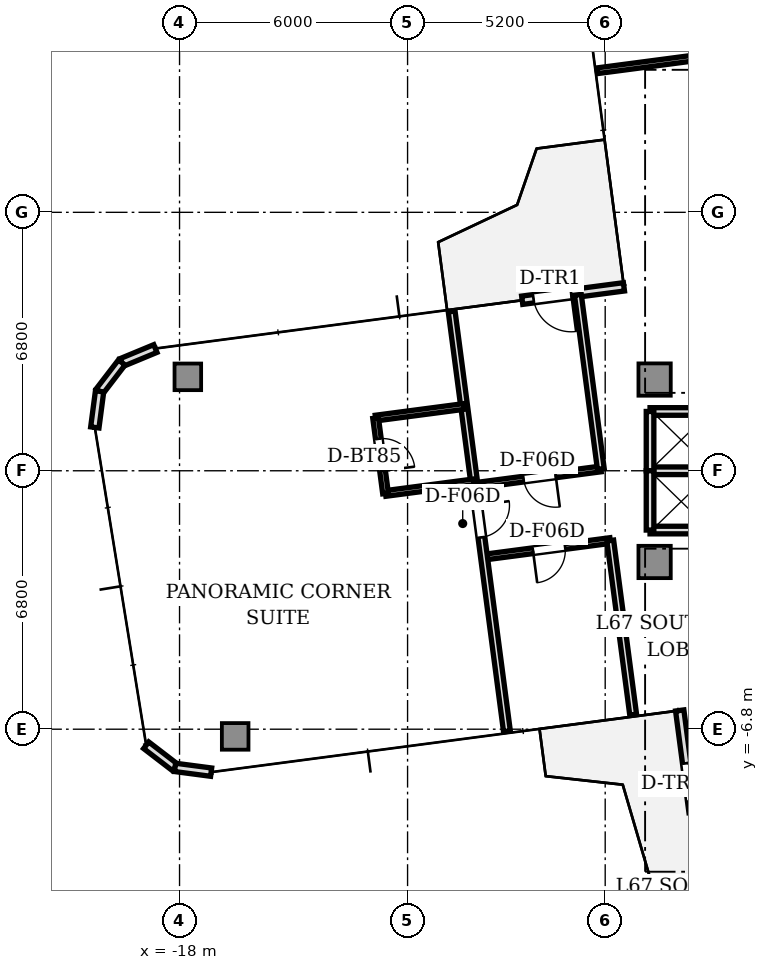
"""IFC4 building model, lengths in metres.
Left out: names, types, materials, properties, quantities, classifications, styles, units other than length and angle.
Written with IfcOpenShell. Run it as: python <this file> out.ifc"""

import sys

from ifc_helpers import new_model, si_unit, direction, frame, frame_2d, origin, origin_2d, place, context, subcontext, project, spatial, rectangle, extrude, source, transform, mapped, element, fill, save


model = new_model("IFC4")
c1 = context("Model", 3, precision=1e-05, world=origin(), true_north=direction((0.0, 1.0)))
c2 = subcontext(c1, "Body", "Model", "MODEL_VIEW")
j1 = project(units=[si_unit("LENGTHUNIT", "METRE"), si_unit("PLANEANGLEUNIT", "RADIAN")], contexts=[c1])
p1 = place(None, origin())
s1 = spatial("IfcSite", under=j1, at=p1, CompositionType="ELEMENT")
p2 = place(p1, origin())
s2 = spatial("IfcBuilding", under=s1, at=p2, CompositionType="ELEMENT")
p3 = place(p2, frame((0.0, 0.0, 241.15)))
s3 = spatial("IfcBuildingStorey", under=s2, at=p3, CompositionType="ELEMENT", Elevation=241.15)
m1 = source(origin(), c2, "Body", "SweptSolid", [
    extrude(rectangle(XDim=0.85, YDim=0.85, at=origin_2d()), origin(), (0.0, 0.0, 1.0), 3.11),
])
for number, where, z_axis, x_axis in (
    (1, (-5.5, 2.4, 0.0), (0.0, 0.0, 1.0), (1.0, 0.0, 0.0)),
    (2, (-5.5, -2.4, 0.0), (0.0, 0.0, 1.0), (1.0, 0.0, 0.0)),
):
    element("IfcColumn", number, at=place(p3, frame(where, z_axis=z_axis, x_axis=x_axis)), inside=s3, PredefinedType="COLUMN", context=c2, shape_type="MappedRepresentation", body=[
        mapped(m1, transform((0.0, 0.0, 0.0), scale=1.0)),
    ])
m2 = source(origin(), c2, "Body", "SweptSolid", [
    extrude(rectangle(XDim=0.7, YDim=0.7, at=origin_2d()), origin(), (0.0, 0.0, 1.0), 3.11),
])
for number, where, z_axis, x_axis in (
    (3, (-17.782, 2.471, 0.0), (0.0, 0.0, 1.0), (1.0, 0.0, 0.0)),
    (4, (-16.536, -6.989, 0.0), (0.0, 0.0, 1.0), (1.0, 0.0, 0.0)),
):
    element("IfcColumn", number, at=place(p3, frame(where, z_axis=z_axis, x_axis=x_axis)), inside=s3, PredefinedType="COLUMN", context=c2, shape_type="MappedRepresentation", body=[
        mapped(m2, transform((0.0, 0.0, 0.0), scale=1.0)),
    ])
p4 = place(p3, frame((-6.307, 4.839, 0.0), z_axis=(0.0, 0.0, 1.0), x_axis=(-0.991449985986, -0.130487261016, 0.0)))
e5 = element("IfcWall", 5, at=p4, inside=s3, PredefinedType="STANDARD", context=c2, shape_type="SweptSolid", body=[
    extrude(rectangle(XDim=2.7, YDim=0.22, at=frame_2d((1.35, 0.0))), origin(), (0.0, 0.0, 1.0), 3.11),
])
p5 = place(p4, frame((1.4, 0.0, 0.0)))
e6 = element("IfcOpeningElement", 6, at=p5, cuts=e5, PredefinedType="OPENING", context=c2, shape_type="SweptSolid", body=[
    extrude(rectangle(XDim=1.0, YDim=2.2, at=frame_2d((0.5, 1.1))), frame((0.0, 0.12, 0.0), z_axis=(0.0, -1.0, 0.0), x_axis=(1.0, 0.0, 0.0)), (0.0, 0.0, 1.0), 0.24),
])
for number, where, z_axis, x_axis in (
    (7, (-18.636, 3.216, 0.0), (0.0, 0.0, 1.0), (-0.924, -0.383, 0.0)),
    (8, (-19.521, 2.85, 0.0), (0.0, 0.0, 1.0), (-0.609, -0.793, 0.0)),
    (9, (-20.104, 2.09, 0.0), (0.0, 0.0, 1.0), (-0.131, -0.991, 0.0)),
):
    element("IfcWall", number, at=place(p3, frame(where, z_axis=z_axis, x_axis=x_axis)), inside=s3, PredefinedType="STANDARD", context=c2, shape_type="SweptSolid", body=[
        extrude(rectangle(XDim=0.958, YDim=0.22, at=frame_2d((0.479, 0.0))), origin(), (0.0, 0.0, 1.0), 3.11),
    ])
p6 = place(p3, frame((-18.878, -7.222, 0.0), z_axis=(0.0, 0.0, 1.0), x_axis=(0.793372339443, -0.608736668033, 0.0)))
e10 = element("IfcWall", 10, at=p6, inside=s3, PredefinedType="STANDARD", context=c2, shape_type="SweptSolid", body=[
    extrude(rectangle(XDim=0.957, YDim=0.22, at=frame_2d((0.479, 0.0))), origin(), (0.0, 0.0, 1.0), 3.11),
])
p7 = place(p3, frame((-18.118, -7.805, 0.0), z_axis=(0.0, 0.0, 1.0), x_axis=(0.991449089759, -0.130494070426, 0.0)))
e11 = element("IfcWall", 11, at=p7, inside=s3, PredefinedType="STANDARD", context=c2, shape_type="SweptSolid", body=[
    extrude(rectangle(XDim=0.958, YDim=0.22, at=frame_2d((0.479, 0.0))), origin(), (0.0, 0.0, 1.0), 3.11),
])
p8 = place(p3, frame((-4.839, -6.307, 0.0), z_axis=(0.0, 0.0, 1.0), x_axis=(0.130487261016, -0.991449985986, 0.0)))
e12 = element("IfcWall", 12, at=p8, inside=s3, PredefinedType="STANDARD", context=c2, shape_type="SweptSolid", body=[
    extrude(rectangle(XDim=2.7, YDim=0.22, at=frame_2d((1.35, 0.0))), origin(), (0.0, 0.0, 1.0), 3.11),
])
p9 = place(p8, frame((1.4, 0.0, 0.0)))
e13 = element("IfcOpeningElement", 13, at=p9, cuts=e12, PredefinedType="OPENING", context=c2, shape_type="SweptSolid", body=[
    extrude(rectangle(XDim=1.0, YDim=2.2, at=frame_2d((0.5, 1.1))), frame((0.0, 0.12, 0.0), z_axis=(0.0, -1.0, 0.0), x_axis=(1.0, 0.0, 0.0)), (0.0, 0.0, 1.0), 0.24),
])
for number, where, z_axis, x_axis in (
    (14, (-5.62, 1.56, 0.0), (0.0, 0.0, 1.0), (1.0, 0.0, 0.0)),
    (15, (-5.62, -1.56, 0.0), (0.0, 0.0, 1.0), (1.0, 0.0, 0.0)),
    (16, (-5.62, 0.0, 0.0), (0.0, 0.0, 1.0), (1.0, 0.0, 0.0)),
):
    element("IfcWall", number, at=place(p3, frame(where, z_axis=z_axis, x_axis=x_axis)), inside=s3, PredefinedType="SOLIDWALL", context=c2, shape_type="SweptSolid", body=[
        extrude(rectangle(XDim=1.64, YDim=0.2, at=frame_2d((0.82, 0.0))), origin(), (0.0, 0.0, 1.0), 2.66),
    ])
for number, where, z_axis, x_axis in (
    (17, (-5.62, 0.0, 0.0), (0.0, 0.0, 1.0), (0.0, 1.0, 0.0)),
    (18, (-5.62, -1.56, 0.0), (0.0, 0.0, 1.0), (0.0, 1.0, 0.0)),
):
    element("IfcWall", number, at=place(p3, frame(where, z_axis=z_axis, x_axis=x_axis)), inside=s3, PredefinedType="SOLIDWALL", context=c2, shape_type="SweptSolid", body=[
        extrude(rectangle(XDim=1.56, YDim=0.2, at=frame_2d((0.78, 0.0))), origin(), (0.0, 0.0, 1.0), 2.66),
    ])
p10 = place(p3, frame((4.042, 11.98, 0.0), z_axis=(0.0, 0.0, 1.0), x_axis=(-0.991444895998, -0.130525929223, 0.0)))
e19 = element("IfcWall", 19, at=p10, inside=s3, PredefinedType="PARTITIONING", context=c2, shape_type="SweptSolid", body=[
    extrude(rectangle(XDim=11.142, YDim=0.15, at=frame_2d((5.571, 0.0))), origin(), (0.0, 0.0, 1.0), 2.66),
])
p11 = place(p10, frame((4.771, 0.0, 0.0)))
e20 = element("IfcOpeningElement", 20, at=p11, cuts=e19, PredefinedType="OPENING", context=c2, shape_type="SweptSolid", body=[
    extrude(rectangle(XDim=1.6, YDim=2.25, at=frame_2d((0.8, 1.125))), frame((0.0, 0.085, 0.0), z_axis=(0.0, -1.0, 0.0), x_axis=(1.0, 0.0, 0.0)), (0.0, 0.0, 1.0), 0.17),
])
p12 = place(p3, frame((-6.667, -1.836, 0.0), z_axis=(0.0, 0.0, 1.0), x_axis=(-0.991444866817, -0.130526150873, 0.0)))
e21 = element("IfcWall", 21, at=p12, inside=s3, PredefinedType="PARTITIONING", context=c2, shape_type="SweptSolid", body=[
    extrude(rectangle(XDim=3.35, YDim=0.15, at=frame_2d((1.675, 0.0))), origin(), (0.0, 0.0, 1.0), 2.66),
])
p13 = place(p12, frame((1.2, 0.0, 0.0)))
e22 = element("IfcOpeningElement", 22, at=p13, cuts=e21, PredefinedType="OPENING", context=c2, shape_type="SweptSolid", body=[
    extrude(rectangle(XDim=0.85, YDim=2.1, at=frame_2d((0.425, 1.05))), frame((0.0, 0.085, 0.0), z_axis=(0.0, -1.0, 0.0), x_axis=(1.0, 0.0, 0.0)), (0.0, 0.0, 1.0), 0.17),
])
p14 = place(p3, frame((-6.915, 0.048, 0.0), z_axis=(0.0, 0.0, 1.0), x_axis=(-0.991446108327, -0.130516720324, 0.0)))
e23 = element("IfcWall", 23, at=p14, inside=s3, PredefinedType="PARTITIONING", context=c2, shape_type="SweptSolid", body=[
    extrude(rectangle(XDim=3.35, YDim=0.15, at=frame_2d((1.675, 0.0))), origin(), (0.0, 0.0, 1.0), 2.66),
])
p15 = place(p14, frame((1.2, 0.0, 0.0)))
e24 = element("IfcOpeningElement", 24, at=p15, cuts=e23, PredefinedType="OPENING", context=c2, shape_type="SweptSolid", body=[
    extrude(rectangle(XDim=0.85, YDim=2.1, at=frame_2d((0.425, 1.05))), frame((0.0, 0.085, 0.0), z_axis=(0.0, -1.0, 0.0), x_axis=(1.0, 0.0, 0.0)), (0.0, 0.0, 1.0), 0.17),
])
p16 = place(p3, frame((-6.667, -1.836, 0.0), z_axis=(0.0, 0.0, 1.0), x_axis=(0.130547444225, -0.991442063263, 0.0)))
e25 = element("IfcWall", 25, at=p16, inside=s3, PredefinedType="PARTITIONING", context=c2, shape_type="SweptSolid", body=[
    extrude(rectangle(XDim=4.621, YDim=0.18, at=frame_2d((2.311, 0.0))), origin(), (0.0, 0.0, 1.0), 2.66),
])
p17 = place(p3, frame((-7.519, 4.629, 0.0), z_axis=(0.0, 0.0, 1.0), x_axis=(0.130554282615, -0.991441162798, 0.0)))
e26 = element("IfcWall", 26, at=p17, inside=s3, PredefinedType="PARTITIONING", context=c2, shape_type="SweptSolid", body=[
    extrude(rectangle(XDim=4.621, YDim=0.18, at=frame_2d((2.311, 0.0))), origin(), (0.0, 0.0, 1.0), 2.66),
])
p18 = place(p3, frame((-10.84, 4.192, 0.0), z_axis=(0.0, 0.0, 1.0), x_axis=(0.130528764816, -0.991444522682, 0.0)))
e27 = element("IfcWall", 27, at=p18, inside=s3, PredefinedType="PARTITIONING", context=c2, shape_type="SweptSolid", body=[
    extrude(rectangle(XDim=11.142, YDim=0.18, at=frame_2d((5.571, 0.0))), origin(), (0.0, 0.0, 1.0), 2.66),
])
p19 = place(p18, frame((5.146, 0.0, 0.0)))
e28 = element("IfcOpeningElement", 28, at=p19, cuts=e27, PredefinedType="OPENING", context=c2, shape_type="SweptSolid", body=[
    extrude(rectangle(XDim=0.85, YDim=2.1, at=frame_2d((0.425, 1.05))), frame((0.0, 0.1, 0.0), z_axis=(0.0, -1.0, 0.0), x_axis=(1.0, 0.0, 0.0)), (0.0, 0.0, 1.0), 0.2),
])
p20 = place(p3, frame((-10.25, -0.29, 0.0), z_axis=(0.0, 0.0, 1.0), x_axis=(-0.991436251812, -0.130591571678, 0.0)))
e29 = element("IfcWall", 29, at=p20, inside=s3, PredefinedType="PARTITIONING", context=c2, shape_type="SweptSolid", body=[
    extrude(rectangle(XDim=2.35, YDim=0.15, at=frame_2d((1.175, 0.0))), origin(), (0.0, 0.0, 1.0), 2.66),
])
p21 = place(p3, frame((-10.511, 1.692, 0.0), z_axis=(0.0, 0.0, 1.0), x_axis=(-0.991451466659, -0.130476010281, 0.0)))
e30 = element("IfcWall", 30, at=p21, inside=s3, PredefinedType="PARTITIONING", context=c2, shape_type="SweptSolid", body=[
    extrude(rectangle(XDim=2.35, YDim=0.15, at=frame_2d((1.175, 0.0))), origin(), (0.0, 0.0, 1.0), 2.66),
])
p22 = place(p3, frame((-12.841, 1.386, 0.0), z_axis=(0.0, 0.0, 1.0), x_axis=(0.130612392842, -0.991433509034, 0.0)))
e31 = element("IfcWall", 31, at=p22, inside=s3, PredefinedType="PARTITIONING", context=c2, shape_type="SweptSolid", body=[
    extrude(rectangle(XDim=2.0, YDim=0.15, at=frame_2d((1.0, 0.0))), origin(), (0.0, 0.0, 1.0), 2.66),
])
p23 = place(p22, frame((0.55, 0.0, 0.0)))
e32 = element("IfcOpeningElement", 32, at=p23, cuts=e31, PredefinedType="OPENING", context=c2, shape_type="SweptSolid", body=[
    extrude(rectangle(XDim=0.85, YDim=2.1, at=frame_2d((0.425, 1.05))), frame((0.0, 0.085, 0.0), z_axis=(0.0, -1.0, 0.0), x_axis=(1.0, 0.0, 0.0)), (0.0, 0.0, 1.0), 0.17),
])
m3 = source(origin(), c2, "Body", "SweptSolid", [
    extrude(rectangle(XDim=1.0, YDim=0.05, at=origin_2d()), origin(), (0.0, 0.0, 1.0), 2.2),
])
p24 = place(p5, frame((0.5, 0.0, 0.0)))
e33 = element("IfcDoor", 33, at=p24, inside=s3, OperationType="SINGLE_SWING_LEFT", PredefinedType="DOOR", context=c2, shape_type="MappedRepresentation", body=[
    mapped(m3, transform((0.0, 0.0, 0.0), scale=1.0)),
])
fill(e6, e33)
p25 = place(p9, frame((0.5, 0.0, 0.0)))
e34 = element("IfcDoor", 34, at=p25, inside=s3, OperationType="SINGLE_SWING_LEFT", PredefinedType="DOOR", context=c2, shape_type="MappedRepresentation", body=[
    mapped(m3, transform((0.0, 0.0, 0.0), scale=1.0)),
])
fill(e13, e34)
m4 = source(origin(), c2, "Body", "SweptSolid", [
    extrude(rectangle(XDim=0.85, YDim=0.05, at=origin_2d()), origin(), (0.0, 0.0, 1.0), 2.1),
])
p26 = place(p13, frame((0.425, 0.0, 0.0)))
e35 = element("IfcDoor", 35, at=p26, inside=s3, OperationType="SINGLE_SWING_RIGHT", PredefinedType="DOOR", context=c2, shape_type="MappedRepresentation", body=[
    mapped(m4, transform((0.0, 0.0, 0.0), scale=1.0)),
])
fill(e22, e35)
p27 = place(p15, frame((0.425, 0.0, 0.0)))
e36 = element("IfcDoor", 36, at=p27, inside=s3, OperationType="SINGLE_SWING_LEFT", PredefinedType="DOOR", context=c2, shape_type="MappedRepresentation", body=[
    mapped(m4, transform((0.0, 0.0, 0.0), scale=1.0)),
])
fill(e24, e36)
p28 = place(p23, frame((0.425, 0.0, 0.0)))
e37 = element("IfcDoor", 37, at=p28, inside=s3, OperationType="SINGLE_SWING_RIGHT", PredefinedType="DOOR", context=c2, shape_type="MappedRepresentation", body=[
    mapped(m4, transform((0.0, 0.0, 0.0), scale=1.0)),
])
fill(e32, e37)
p29 = place(p19, frame((0.425, 0.0, 0.0)))
e38 = element("IfcDoor", 38, at=p29, inside=s3, OperationType="SINGLE_SWING_LEFT", PredefinedType="DOOR", context=c2, shape_type="MappedRepresentation", body=[
    mapped(m4, transform((0.0, 0.0, 0.0), scale=1.0)),
])
fill(e28, e38)
save(model, sys.argv[1])
